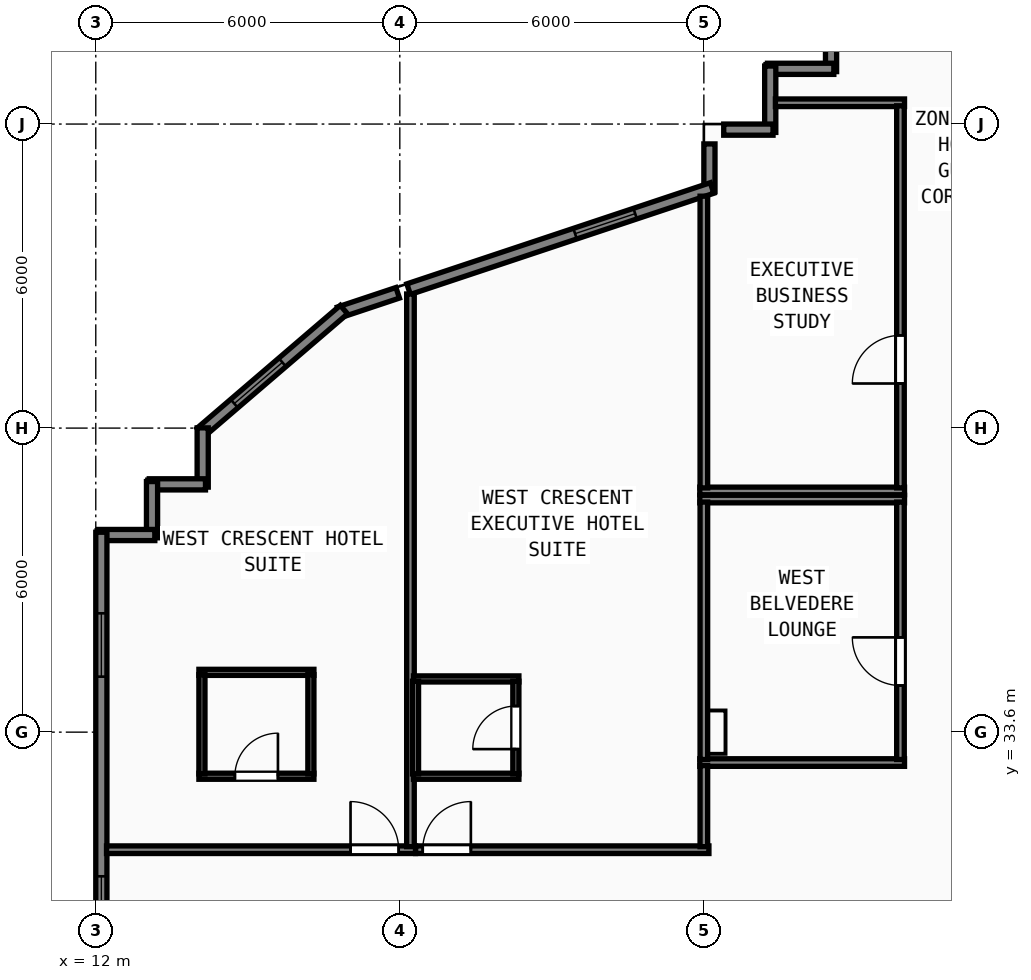
"""IFC4 building model, lengths in metres.
Left out: names, types, materials, properties, quantities, classifications, styles, units other than length and angle.
Written with IfcOpenShell. Run it as: python <this file> out.ifc"""

import sys

from ifc_helpers import new_model, si_unit, direction, frame, frame_2d, origin, origin_2d, place, context, subcontext, project, spatial, rectangle, hollow_rectangle, extrude, element, fill, save


model = new_model("IFC4")
c1 = context("Model", 3, precision=1e-05, world=origin(), true_north=direction((0.0, 1.0)))
c2 = subcontext(c1, "Body", "Model", "MODEL_VIEW")
j1 = project(units=[si_unit("LENGTHUNIT", "METRE"), si_unit("PLANEANGLEUNIT", "RADIAN")], contexts=[c1])
p1 = place(None, origin())
s1 = spatial("IfcSite", under=j1, at=p1, CompositionType="ELEMENT")
p2 = place(p1, origin())
s2 = spatial("IfcBuilding", under=s1, at=p2, CompositionType="ELEMENT")
p3 = place(p2, frame((0.0, 0.0, 235.2)))
s3 = spatial("IfcBuildingStorey", under=s2, at=p3, CompositionType="ELEMENT", Elevation=235.2)
for number, where, z_axis, x_axis in (
    (1, (24.0, 33.6, 0.0), (0.0, 0.0, 1.0), (1.0, 0.0, 0.0)),
    (2, (24.0, 45.6, 0.0), (0.0, 0.0, 1.0), (1.0, 0.0, 0.0)),
):
    element("IfcColumn", number, at=place(p3, frame(where, z_axis=z_axis, x_axis=x_axis)), inside=s3, PredefinedType="COLUMN", context=c2, shape_type="SweptSolid", body=[
        extrude(hollow_rectangle(XDim=0.8, YDim=0.8, WallThickness=0.03, at=origin_2d()), origin(), (0.0, 0.0, 1.0), 3.85),
    ])
for number, where, z_axis, x_axis in (
    (3, (24.0, 39.6, 0.0), (0.0, 0.0, 1.0), (1.0, 0.0, 0.0)),
    (4, (18.3, 42.0, 0.0), (0.0, 0.0, 1.0), (1.0, 0.0, 0.0)),
):
    element("IfcColumn", number, at=place(p3, frame(where, z_axis=z_axis, x_axis=x_axis)), inside=s3, PredefinedType="COLUMN", context=c2, shape_type="SweptSolid", body=[
        extrude(hollow_rectangle(XDim=0.7, YDim=0.7, WallThickness=0.026, at=origin_2d()), origin(), (0.0, 0.0, 1.0), 3.85),
    ])
p4 = place(p3, frame((26.51, 48.0, 0.0), z_axis=(0.0, 0.0, 1.0), x_axis=(0.0, -1.0, 0.0)))
e5 = element("IfcWall", 5, at=p4, inside=s3, PredefinedType="SOLIDWALL", context=c2, shape_type="SweptSolid", body=[
    extrude(rectangle(XDim=1.365, YDim=0.22, at=frame_2d((0.683, 0.0))), origin(), (0.0, 0.0, 1.0), 3.67),
])
for number, where, z_axis, x_axis in (
    (6, (26.565, 46.69, 0.0), (0.0, 0.0, 1.0), (-1.0, 0.0, 0.0)),
    (7, (25.31, 46.745, 0.0), (0.0, 0.0, 1.0), (0.0, -1.0, 0.0)),
):
    element("IfcWall", number, at=place(p3, frame(where, z_axis=z_axis, x_axis=x_axis)), inside=s3, PredefinedType="SOLIDWALL", context=c2, shape_type="SweptSolid", body=[
        extrude(rectangle(XDim=1.31, YDim=0.22, at=frame_2d((0.655, 0.0))), origin(), (0.0, 0.0, 1.0), 3.67),
    ])
p5 = place(p3, frame((25.365, 45.49, 0.0), z_axis=(0.0, 0.0, 1.0), x_axis=(-1.0, 0.0, 0.0)))
e8 = element("IfcWall", 8, at=p5, inside=s3, PredefinedType="SOLIDWALL", context=c2, shape_type="SweptSolid", body=[
    extrude(rectangle(XDim=0.973, YDim=0.22, at=frame_2d((0.486, 0.0))), origin(), (0.0, 0.0, 1.0), 3.67),
])
p6 = place(p3, frame((24.11, 45.208, 0.0), z_axis=(0.0, 0.0, 1.0), x_axis=(0.0, -1.0, 0.0)))
e9 = element("IfcWall", 9, at=p6, inside=s3, PredefinedType="SOLIDWALL", context=c2, shape_type="SweptSolid", body=[
    extrude(rectangle(XDim=0.942, YDim=0.22, at=frame_2d((0.471, 0.0))), origin(), (0.0, 0.0, 1.0), 3.315),
])
p7 = place(p3, frame((24.162, 44.338, 0.0), z_axis=(0.0, 0.0, 1.0), x_axis=(-0.948687165594, -0.31621616315, 0.0)))
e10 = element("IfcWall", 10, at=p7, inside=s3, PredefinedType="SOLIDWALL", context=c2, shape_type="SweptSolid", body=[
    extrude(rectangle(XDim=6.312, YDim=0.22, at=frame_2d((3.156, 0.0))), origin(), (0.0, 0.0, 1.0), 3.315),
])
p8 = place(p7, frame((1.6, 0.0, 0.85)))
e11 = element("IfcOpeningElement", 11, at=p8, cuts=e10, PredefinedType="OPENING", context=c2, shape_type="SweptSolid", body=[
    extrude(rectangle(XDim=1.25, YDim=1.95, at=frame_2d((0.625, 0.975))), frame((0.0, 0.12, 0.0), z_axis=(0.0, -1.0, 0.0), x_axis=(1.0, 0.0, 0.0)), (0.0, 0.0, 1.0), 0.24),
])
p9 = place(p3, frame((17.958, 42.27, 0.0), z_axis=(0.0, 0.0, 1.0), x_axis=(-0.948683298051, -0.316227766017, 0.0)))
e12 = element("IfcWall", 12, at=p9, inside=s3, PredefinedType="SOLIDWALL", context=c2, shape_type="SweptSolid", body=[
    extrude(rectangle(XDim=1.218, YDim=0.22, at=frame_2d((0.609, 0.0))), origin(), (0.0, 0.0, 1.0), 3.67),
])
p10 = place(p3, frame((16.897, 41.938, 0.0), z_axis=(0.0, 0.0, 1.0), x_axis=(-0.759279729622, -0.650764390686, 0.0)))
e13 = element("IfcWall", 13, at=p10, inside=s3, PredefinedType="SOLIDWALL", context=c2, shape_type="SweptSolid", body=[
    extrude(rectangle(XDim=3.726, YDim=0.22, at=frame_2d((1.863, 0.0))), origin(), (0.0, 0.0, 1.0), 3.67),
])
p11 = place(p10, frame((1.6, 0.0, 0.85)))
e14 = element("IfcOpeningElement", 14, at=p11, cuts=e13, PredefinedType="OPENING", context=c2, shape_type="SweptSolid", body=[
    extrude(rectangle(XDim=1.25, YDim=1.95, at=frame_2d((0.625, 0.975))), frame((0.0, 0.12, 0.0), z_axis=(0.0, -1.0, 0.0), x_axis=(1.0, 0.0, 0.0)), (0.0, 0.0, 1.0), 0.24),
])
p12 = place(p3, frame((14.11, 39.604, 0.0), z_axis=(0.0, 0.0, 1.0), x_axis=(0.0, -1.0, 0.0)))
e15 = element("IfcWall", 15, at=p12, inside=s3, PredefinedType="SOLIDWALL", context=c2, shape_type="SweptSolid", body=[
    extrude(rectangle(XDim=1.169, YDim=0.22, at=frame_2d((0.585, 0.0))), origin(), (0.0, 0.0, 1.0), 3.67),
])
p13 = place(p3, frame((14.165, 38.49, 0.0), z_axis=(0.0, 0.0, 1.0), x_axis=(-1.0, 0.0, 0.0)))
e16 = element("IfcWall", 16, at=p13, inside=s3, PredefinedType="SOLIDWALL", context=c2, shape_type="SweptSolid", body=[
    extrude(rectangle(XDim=1.11, YDim=0.22, at=frame_2d((0.555, 0.0))), origin(), (0.0, 0.0, 1.0), 3.67),
])
p14 = place(p3, frame((13.11, 38.545, 0.0), z_axis=(0.0, 0.0, 1.0), x_axis=(0.0, -1.0, 0.0)))
e17 = element("IfcWall", 17, at=p14, inside=s3, PredefinedType="SOLIDWALL", context=c2, shape_type="SweptSolid", body=[
    extrude(rectangle(XDim=1.11, YDim=0.22, at=frame_2d((0.555, 0.0))), origin(), (0.0, 0.0, 1.0), 3.67),
])
p15 = place(p3, frame((13.165, 37.49, 0.0), z_axis=(0.0, 0.0, 1.0), x_axis=(-1.0, 0.0, 0.0)))
e18 = element("IfcWall", 18, at=p15, inside=s3, PredefinedType="SOLIDWALL", context=c2, shape_type="SweptSolid", body=[
    extrude(rectangle(XDim=1.11, YDim=0.22, at=frame_2d((0.555, 0.0))), origin(), (0.0, 0.0, 1.0), 3.67),
])
p16 = place(p3, frame((12.11, 37.545, 0.0), z_axis=(0.0, 0.0, 1.0), x_axis=(0.0, -1.0, 0.0)))
e19 = element("IfcWall", 19, at=p16, inside=s3, PredefinedType="SOLIDWALL", context=c2, shape_type="SweptSolid", body=[
    extrude(rectangle(XDim=21.145, YDim=0.22, at=frame_2d((10.573, 0.0))), origin(), (0.0, 0.0, 1.0), 3.67),
])
p17 = place(p16, frame((1.6, 0.0, 0.85)))
e20 = element("IfcOpeningElement", 20, at=p17, cuts=e19, PredefinedType="OPENING", context=c2, shape_type="SweptSolid", body=[
    extrude(rectangle(XDim=1.25, YDim=1.95, at=frame_2d((0.625, 0.975))), frame((0.0, 0.12, 0.0), z_axis=(0.0, -1.0, 0.0), x_axis=(1.0, 0.0, 0.0)), (0.0, 0.0, 1.0), 0.24),
])
p18 = place(p16, frame((6.79, 0.0, 0.85)))
e21 = element("IfcOpeningElement", 21, at=p18, cuts=e19, PredefinedType="OPENING", context=c2, shape_type="SweptSolid", body=[
    extrude(rectangle(XDim=1.25, YDim=1.95, at=frame_2d((0.625, 0.975))), frame((0.0, 0.12, 0.0), z_axis=(0.0, -1.0, 0.0), x_axis=(1.0, 0.0, 0.0)), (0.0, 0.0, 1.0), 0.24),
])
p19 = place(p16, frame((12.4, 0.0, 0.85)))
e22 = element("IfcOpeningElement", 22, at=p19, cuts=e19, PredefinedType="OPENING", context=c2, shape_type="SweptSolid", body=[
    extrude(rectangle(XDim=1.25, YDim=1.95, at=frame_2d((0.625, 0.975))), frame((0.0, 0.12, 0.0), z_axis=(0.0, -1.0, 0.0), x_axis=(1.0, 0.0, 0.0)), (0.0, 0.0, 1.0), 0.24),
])
p20 = place(p16, frame((17.8, 0.0, 0.85)))
e23 = element("IfcOpeningElement", 23, at=p20, cuts=e19, PredefinedType="OPENING", context=c2, shape_type="SweptSolid", body=[
    extrude(rectangle(XDim=1.25, YDim=1.95, at=frame_2d((0.625, 0.975))), frame((0.0, 0.12, 0.0), z_axis=(0.0, -1.0, 0.0), x_axis=(1.0, 0.0, 0.0)), (0.0, 0.0, 1.0), 0.24),
])
for number, where, z_axis, x_axis in (
    (24, (23.92, 38.2, 0.0), (0.0, 0.0, 1.0), (1.0, 0.0, 0.0)),
    (25, (23.92, 33.0, 0.0), (0.0, 0.0, 1.0), (1.0, 0.0, 0.0)),
):
    element("IfcWall", number, at=place(p3, frame(where, z_axis=z_axis, x_axis=x_axis)), inside=s3, PredefinedType="PARTITIONING", context=c2, shape_type="SweptSolid", body=[
        extrude(rectangle(XDim=4.04, YDim=0.15, at=frame_2d((2.02, 0.0))), origin(), (0.0, 0.0, 1.0), 3.67),
    ])
p21 = place(p3, frame((24.0, 33.06, 0.0), z_axis=(0.0, 0.0, 1.0), x_axis=(0.0, 1.0, 0.0)))
e26 = element("IfcWall", 26, at=p21, inside=s3, PredefinedType="PARTITIONING", context=c2, shape_type="SweptSolid", body=[
    extrude(rectangle(XDim=5.08, YDim=0.15, at=frame_2d((2.54, 0.0))), origin(), (0.0, 0.0, 1.0), 3.315),
])
p22 = place(p3, frame((27.88, 33.06, 0.0), z_axis=(0.0, 0.0, 1.0), x_axis=(0.0, 1.0, 0.0)))
e27 = element("IfcWall", 27, at=p22, inside=s3, PredefinedType="PARTITIONING", context=c2, shape_type="SweptSolid", body=[
    extrude(rectangle(XDim=5.08, YDim=0.15, at=frame_2d((2.54, 0.0))), origin(), (0.0, 0.0, 1.0), 3.67),
])
p23 = place(p22, frame((2.41, 0.0, 0.0), z_axis=(0.0, 0.0, 1.0), x_axis=(-1.0, 0.0, 0.0)))
e28 = element("IfcOpeningElement", 28, at=p23, cuts=e27, PredefinedType="OPENING", context=c2, shape_type="SweptSolid", body=[
    extrude(rectangle(XDim=0.95, YDim=2.12, at=frame_2d((0.475, 1.06))), frame((0.0, 0.085, 0.0), z_axis=(0.0, -1.0, 0.0), x_axis=(1.0, 0.0, 0.0)), (0.0, 0.0, 1.0), 0.17),
])
p24 = place(p3, frame((25.412, 46.02, 0.0), z_axis=(0.0, 0.0, 1.0), x_axis=(1.0, 0.0, 0.0)))
e29 = element("IfcWall", 29, at=p24, inside=s3, PredefinedType="PARTITIONING", context=c2, shape_type="SweptSolid", body=[
    extrude(rectangle(XDim=2.548, YDim=0.15, at=frame_2d((1.274, 0.0))), origin(), (0.0, 0.0, 1.0), 3.67),
])
p25 = place(p3, frame((23.92, 38.36, 0.0), z_axis=(0.0, 0.0, 1.0), x_axis=(1.0, 0.0, 0.0)))
e30 = element("IfcWall", 30, at=p25, inside=s3, PredefinedType="PARTITIONING", context=c2, shape_type="SweptSolid", body=[
    extrude(rectangle(XDim=4.04, YDim=0.15, at=frame_2d((2.02, 0.0))), origin(), (0.0, 0.0, 1.0), 3.67),
])
p26 = place(p3, frame((24.0, 38.42, 0.0), z_axis=(0.0, 0.0, 1.0), x_axis=(0.0, 1.0, 0.0)))
e31 = element("IfcWall", 31, at=p26, inside=s3, PredefinedType="PARTITIONING", context=c2, shape_type="SweptSolid", body=[
    extrude(rectangle(XDim=5.757, YDim=0.15, at=frame_2d((2.878, 0.0))), origin(), (0.0, 0.0, 1.0), 3.315),
])
p27 = place(p3, frame((27.88, 38.42, 0.0), z_axis=(0.0, 0.0, 1.0), x_axis=(0.0, 1.0, 0.0)))
e32 = element("IfcWall", 32, at=p27, inside=s3, PredefinedType="PARTITIONING", context=c2, shape_type="SweptSolid", body=[
    extrude(rectangle(XDim=7.54, YDim=0.15, at=frame_2d((3.77, 0.0))), origin(), (0.0, 0.0, 1.0), 3.67),
])
p28 = place(p27, frame((3.01, 0.0, 0.0), z_axis=(0.0, 0.0, 1.0), x_axis=(-1.0, 0.0, 0.0)))
e33 = element("IfcOpeningElement", 33, at=p28, cuts=e32, PredefinedType="OPENING", context=c2, shape_type="SweptSolid", body=[
    extrude(rectangle(XDim=0.95, YDim=2.12, at=frame_2d((0.475, 1.06))), frame((0.0, 0.085, 0.0), z_axis=(0.0, -1.0, 0.0), x_axis=(1.0, 0.0, 0.0)), (0.0, 0.0, 1.0), 0.17),
])
p29 = place(p3, frame((12.212, 31.28, 0.0), z_axis=(0.0, 0.0, 1.0), x_axis=(1.0, 0.0, 0.0)))
e34 = element("IfcWall", 34, at=p29, inside=s3, PredefinedType="PARTITIONING", context=c2, shape_type="SweptSolid", body=[
    extrude(rectangle(XDim=6.098, YDim=0.15, at=frame_2d((3.049, 0.0))), origin(), (0.0, 0.0, 1.0), 3.67),
])
p30 = place(p29, frame((4.816, 0.0, 0.0)))
e35 = element("IfcOpeningElement", 35, at=p30, cuts=e34, PredefinedType="OPENING", context=c2, shape_type="SweptSolid", body=[
    extrude(rectangle(XDim=0.95, YDim=2.18, at=frame_2d((0.475, 1.09))), frame((0.0, 0.085, 0.0), z_axis=(0.0, -1.0, 0.0), x_axis=(1.0, 0.0, 0.0)), (0.0, 0.0, 1.0), 0.17),
])
p31 = place(p3, frame((18.21, 31.34, 0.0), z_axis=(0.0, 0.0, 1.0), x_axis=(0.0, 1.0, 0.0)))
e36 = element("IfcWall", 36, at=p31, inside=s3, PredefinedType="PARTITIONING", context=c2, shape_type="SweptSolid", body=[
    extrude(rectangle(XDim=10.906, YDim=0.15, at=frame_2d((5.453, 0.0))), origin(), (0.0, 0.0, 1.0), 3.67),
])
p32 = place(p3, frame((14.035, 34.78, 0.0), z_axis=(0.0, 0.0, 1.0), x_axis=(1.0, 0.0, 0.0)))
e37 = element("IfcWall", 37, at=p32, inside=s3, PredefinedType="PARTITIONING", context=c2, shape_type="SweptSolid", body=[
    extrude(rectangle(XDim=2.27, YDim=0.12, at=frame_2d((1.135, 0.0))), origin(), (0.0, 0.0, 1.0), 3.67),
])
p33 = place(p3, frame((14.035, 32.73, 0.0), z_axis=(0.0, 0.0, 1.0), x_axis=(1.0, 0.0, 0.0)))
e38 = element("IfcWall", 38, at=p33, inside=s3, PredefinedType="PARTITIONING", context=c2, shape_type="SweptSolid", body=[
    extrude(rectangle(XDim=2.27, YDim=0.12, at=frame_2d((1.135, 0.0))), origin(), (0.0, 0.0, 1.0), 3.67),
])
p34 = place(p33, frame((0.71, 0.0, 0.0)))
e39 = element("IfcOpeningElement", 39, at=p34, cuts=e38, PredefinedType="OPENING", context=c2, shape_type="SweptSolid", body=[
    extrude(rectangle(XDim=0.85, YDim=2.1, at=frame_2d((0.425, 1.05))), frame((0.0, 0.07, 0.0), z_axis=(0.0, -1.0, 0.0), x_axis=(1.0, 0.0, 0.0)), (0.0, 0.0, 1.0), 0.14),
])
for number, where, z_axis, x_axis in (
    (40, (14.095, 32.775, 0.0), (0.0, 0.0, 1.0), (0.0, 1.0, 0.0)),
    (41, (16.245, 32.775, 0.0), (0.0, 0.0, 1.0), (0.0, 1.0, 0.0)),
):
    element("IfcWall", number, at=place(p3, frame(where, z_axis=z_axis, x_axis=x_axis)), inside=s3, PredefinedType="PARTITIONING", context=c2, shape_type="SweptSolid", body=[
        extrude(rectangle(XDim=1.96, YDim=0.12, at=frame_2d((0.98, 0.0))), origin(), (0.0, 0.0, 1.0), 3.67),
    ])
p35 = place(p3, frame((18.312, 31.28, 0.0), z_axis=(0.0, 0.0, 1.0), x_axis=(1.0, 0.0, 0.0)))
e42 = element("IfcWall", 42, at=p35, inside=s3, PredefinedType="PARTITIONING", context=c2, shape_type="SweptSolid", body=[
    extrude(rectangle(XDim=5.788, YDim=0.15, at=frame_2d((2.894, 0.0))), origin(), (0.0, 0.0, 1.0), 3.67),
])
p36 = place(p35, frame((0.14, 0.0, 0.0)))
e43 = element("IfcOpeningElement", 43, at=p36, cuts=e42, PredefinedType="OPENING", context=c2, shape_type="SweptSolid", body=[
    extrude(rectangle(XDim=0.95, YDim=2.18, at=frame_2d((0.475, 1.09))), frame((0.0, 0.085, 0.0), z_axis=(0.0, -1.0, 0.0), x_axis=(1.0, 0.0, 0.0)), (0.0, 0.0, 1.0), 0.17),
])
p37 = place(p3, frame((24.0, 31.34, 0.0), z_axis=(0.0, 0.0, 1.0), x_axis=(0.0, 1.0, 0.0)))
e44 = element("IfcWall", 44, at=p37, inside=s3, PredefinedType="PARTITIONING", context=c2, shape_type="SweptSolid", body=[
    extrude(rectangle(XDim=1.6, YDim=0.15, at=frame_2d((0.8, 0.0))), origin(), (0.0, 0.0, 1.0), 3.315),
])
for number, where, z_axis, x_axis in (
    (45, (18.27, 34.65, 0.0), (0.0, 0.0, 1.0), (1.0, 0.0, 0.0)),
    (46, (18.27, 32.73, 0.0), (0.0, 0.0, 1.0), (1.0, 0.0, 0.0)),
):
    element("IfcWall", number, at=place(p3, frame(where, z_axis=z_axis, x_axis=x_axis)), inside=s3, PredefinedType="PARTITIONING", context=c2, shape_type="SweptSolid", body=[
        extrude(rectangle(XDim=2.08, YDim=0.12, at=frame_2d((1.04, 0.0))), origin(), (0.0, 0.0, 1.0), 3.67),
    ])
p38 = place(p3, frame((18.31, 32.775, 0.0), z_axis=(0.0, 0.0, 1.0), x_axis=(0.0, 1.0, 0.0)))
e47 = element("IfcWall", 47, at=p38, inside=s3, PredefinedType="PARTITIONING", context=c2, shape_type="SweptSolid", body=[
    extrude(rectangle(XDim=1.83, YDim=0.12, at=frame_2d((0.915, 0.0))), origin(), (0.0, 0.0, 1.0), 3.67),
])
p39 = place(p3, frame((20.29, 32.775, 0.0), z_axis=(0.0, 0.0, 1.0), x_axis=(0.0, 1.0, 0.0)))
e48 = element("IfcWall", 48, at=p39, inside=s3, PredefinedType="PARTITIONING", context=c2, shape_type="SweptSolid", body=[
    extrude(rectangle(XDim=1.83, YDim=0.12, at=frame_2d((0.915, 0.0))), origin(), (0.0, 0.0, 1.0), 3.67),
])
p40 = place(p39, frame((0.49, 0.0, 0.0)))
e49 = element("IfcOpeningElement", 49, at=p40, cuts=e48, PredefinedType="OPENING", context=c2, shape_type="SweptSolid", body=[
    extrude(rectangle(XDim=0.85, YDim=2.1, at=frame_2d((0.425, 1.05))), frame((0.0, 0.07, 0.0), z_axis=(0.0, -1.0, 0.0), x_axis=(1.0, 0.0, 0.0)), (0.0, 0.0, 1.0), 0.14),
])
p41 = place(p8, origin())
e50 = element("IfcWindow", 50, at=p41, inside=s3, PartitioningType="SINGLE_PANEL", PredefinedType="WINDOW", context=c2, shape_type="SweptSolid", body=[
    extrude(rectangle(XDim=1.25, YDim=1.95, at=frame_2d((0.625, 0.975))), frame((0.0, 0.03, 0.0), z_axis=(0.0, -1.0, 0.0), x_axis=(1.0, 0.0, 0.0)), (0.0, 0.0, 1.0), 0.06),
])
fill(e11, e50)
p42 = place(p11, origin())
e51 = element("IfcWindow", 51, at=p42, inside=s3, PartitioningType="SINGLE_PANEL", PredefinedType="WINDOW", context=c2, shape_type="SweptSolid", body=[
    extrude(rectangle(XDim=1.25, YDim=1.95, at=frame_2d((0.625, 0.975))), frame((0.0, 0.03, 0.0), z_axis=(0.0, -1.0, 0.0), x_axis=(1.0, 0.0, 0.0)), (0.0, 0.0, 1.0), 0.06),
])
fill(e14, e51)
p43 = place(p17, origin())
e52 = element("IfcWindow", 52, at=p43, inside=s3, PartitioningType="SINGLE_PANEL", PredefinedType="WINDOW", context=c2, shape_type="SweptSolid", body=[
    extrude(rectangle(XDim=1.25, YDim=1.95, at=frame_2d((0.625, 0.975))), frame((0.0, 0.03, 0.0), z_axis=(0.0, -1.0, 0.0), x_axis=(1.0, 0.0, 0.0)), (0.0, 0.0, 1.0), 0.06),
])
fill(e20, e52)
p44 = place(p18, origin())
e53 = element("IfcWindow", 53, at=p44, inside=s3, PartitioningType="SINGLE_PANEL", PredefinedType="WINDOW", context=c2, shape_type="SweptSolid", body=[
    extrude(rectangle(XDim=1.25, YDim=1.95, at=frame_2d((0.625, 0.975))), frame((0.0, 0.03, 0.0), z_axis=(0.0, -1.0, 0.0), x_axis=(1.0, 0.0, 0.0)), (0.0, 0.0, 1.0), 0.06),
])
fill(e21, e53)
p45 = place(p23, origin())
e54 = element("IfcDoor", 54, at=p45, inside=s3, OperationType="SINGLE_SWING_LEFT", PredefinedType="DOOR", context=c2, shape_type="SweptSolid", body=[
    extrude(rectangle(XDim=0.95, YDim=2.12, at=frame_2d((0.475, 1.06))), frame((0.0, 0.025, 0.0), z_axis=(0.0, -1.0, 0.0), x_axis=(1.0, 0.0, 0.0)), (0.0, 0.0, 1.0), 0.05),
])
fill(e28, e54)
p46 = place(p28, origin())
e55 = element("IfcDoor", 55, at=p46, inside=s3, OperationType="SINGLE_SWING_RIGHT", PredefinedType="DOOR", context=c2, shape_type="SweptSolid", body=[
    extrude(rectangle(XDim=0.95, YDim=2.12, at=frame_2d((0.475, 1.06))), frame((0.0, 0.025, 0.0), z_axis=(0.0, -1.0, 0.0), x_axis=(1.0, 0.0, 0.0)), (0.0, 0.0, 1.0), 0.05),
])
fill(e33, e55)
p47 = place(p30, origin())
e56 = element("IfcDoor", 56, at=p47, inside=s3, OperationType="SINGLE_SWING_LEFT", PredefinedType="DOOR", context=c2, shape_type="SweptSolid", body=[
    extrude(rectangle(XDim=0.95, YDim=2.18, at=frame_2d((0.475, 1.09))), frame((0.0, 0.025, 0.0), z_axis=(0.0, -1.0, 0.0), x_axis=(1.0, 0.0, 0.0)), (0.0, 0.0, 1.0), 0.05),
])
fill(e35, e56)
p48 = place(p34, origin())
e57 = element("IfcDoor", 57, at=p48, inside=s3, OperationType="SINGLE_SWING_RIGHT", PredefinedType="DOOR", context=c2, shape_type="SweptSolid", body=[
    extrude(rectangle(XDim=0.85, YDim=2.1, at=frame_2d((0.425, 1.05))), frame((0.0, 0.025, 0.0), z_axis=(0.0, -1.0, 0.0), x_axis=(1.0, 0.0, 0.0)), (0.0, 0.0, 1.0), 0.05),
])
fill(e39, e57)
p49 = place(p36, origin())
e58 = element("IfcDoor", 58, at=p49, inside=s3, OperationType="SINGLE_SWING_RIGHT", PredefinedType="DOOR", context=c2, shape_type="SweptSolid", body=[
    extrude(rectangle(XDim=0.95, YDim=2.18, at=frame_2d((0.475, 1.09))), frame((0.0, 0.025, 0.0), z_axis=(0.0, -1.0, 0.0), x_axis=(1.0, 0.0, 0.0)), (0.0, 0.0, 1.0), 0.05),
])
fill(e43, e58)
p50 = place(p40, origin())
e59 = element("IfcDoor", 59, at=p50, inside=s3, OperationType="SINGLE_SWING_LEFT", PredefinedType="DOOR", context=c2, shape_type="SweptSolid", body=[
    extrude(rectangle(XDim=0.85, YDim=2.1, at=frame_2d((0.425, 1.05))), frame((0.0, 0.025, 0.0), z_axis=(0.0, -1.0, 0.0), x_axis=(1.0, 0.0, 0.0)), (0.0, 0.0, 1.0), 0.05),
])
fill(e49, e59)
save(model, sys.argv[1])
